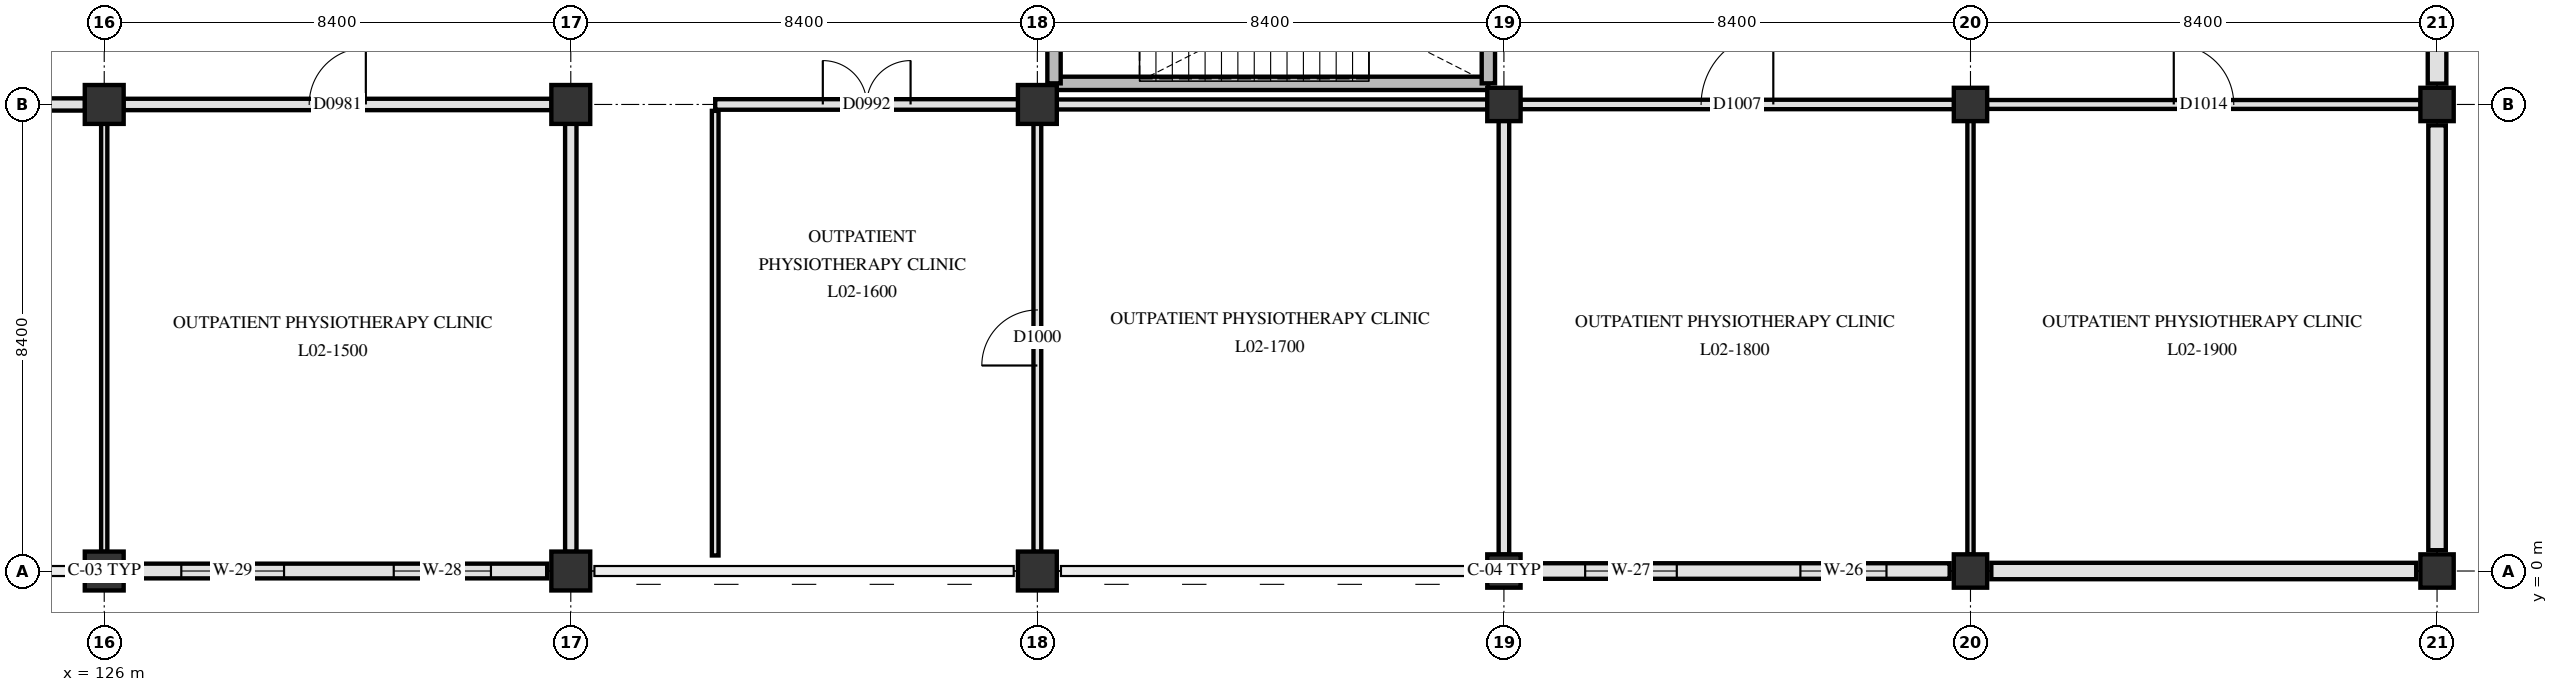
"""IFC4 building model, lengths in metres.
Left out: names, types, materials, properties, quantities, classifications, styles, units other than length and angle.
Written with IfcOpenShell. Run it as: python <this file> out.ifc"""

import sys

from ifc_helpers import new_model, si_unit, direction, frame, frame_2d, origin, origin_2d, place, context, subcontext, project, spatial, rectangle, extrude, element, fill, save


model = new_model("IFC4")
c1 = context("Model", 3, precision=1e-05, world=origin(), true_north=direction((0.0, 1.0)))
c2 = subcontext(c1, "Body", "Model", "MODEL_VIEW")
j1 = project(units=[si_unit("LENGTHUNIT", "METRE"), si_unit("PLANEANGLEUNIT", "RADIAN")], contexts=[c1])
p1 = place(None, origin())
s1 = spatial("IfcSite", under=j1, at=p1, CompositionType="ELEMENT")
p2 = place(p1, origin())
s2 = spatial("IfcBuilding", under=s1, at=p2, CompositionType="ELEMENT")
p3 = place(p2, frame((0.0, 0.0, 9.3)))
s3 = spatial("IfcBuildingStorey", under=s2, at=p3, CompositionType="ELEMENT", Elevation=9.3)
for number, where, z_axis, x_axis in (
    (1, (126.0, 0.0, 0.0), (0.0, 0.0, 1.0), (1.0, 0.0, 0.0)),
    (2, (126.0, 8.4, 0.0), (0.0, 0.0, 1.0), (1.0, 0.0, 0.0)),
    (3, (134.4, 0.0, 0.0), (0.0, 0.0, 1.0), (1.0, 0.0, 0.0)),
    (4, (134.4, 8.4, 0.0), (0.0, 0.0, 1.0), (1.0, 0.0, 0.0)),
    (5, (142.8, 0.0, 0.0), (0.0, 0.0, 1.0), (1.0, 0.0, 0.0)),
    (6, (142.8, 8.4, 0.0), (0.0, 0.0, 1.0), (1.0, 0.0, 0.0)),
):
    element("IfcColumn", number, at=place(p3, frame(where, z_axis=z_axis, x_axis=x_axis)), inside=s3, PredefinedType="COLUMN", context=c2, shape_type="SweptSolid", body=[
        extrude(rectangle(XDim=0.7, YDim=0.7, at=origin_2d()), origin(), (0.0, 0.0, 1.0), 5.1),
    ])
for number, where, z_axis, x_axis in (
    (7, (151.2, 0.0, 0.0), (0.0, 0.0, 1.0), (1.0, 0.0, 0.0)),
    (8, (151.2, 8.4, 0.0), (0.0, 0.0, 1.0), (1.0, 0.0, 0.0)),
    (9, (159.6, 0.0, 0.0), (0.0, 0.0, 1.0), (1.0, 0.0, 0.0)),
    (10, (159.6, 8.4, 0.0), (0.0, 0.0, 1.0), (1.0, 0.0, 0.0)),
    (11, (168.0, 0.0, 0.0), (0.0, 0.0, 1.0), (1.0, 0.0, 0.0)),
    (12, (168.0, 8.4, 0.0), (0.0, 0.0, 1.0), (1.0, 0.0, 0.0)),
):
    element("IfcColumn", number, at=place(p3, frame(where, z_axis=z_axis, x_axis=x_axis)), inside=s3, PredefinedType="COLUMN", context=c2, shape_type="SweptSolid", body=[
        extrude(rectangle(XDim=0.6, YDim=0.6, at=origin_2d()), origin(), (0.0, 0.0, 1.0), 5.1),
    ])
p4 = place(p3, frame((168.0, 16.425, 0.0), z_axis=(0.0, 0.0, 1.0), x_axis=(0.0, -1.0, 0.0)))
e13 = element("IfcWall", 13, at=p4, inside=s3, PredefinedType="SOLIDWALL", context=c2, shape_type="SweptSolid", body=[
    extrude(rectangle(XDim=7.65, YDim=0.335, at=frame_2d((3.825, 0.0))), origin(), (0.0, 0.0, 1.0), 4.07),
])
p5 = place(p4, frame((1.238, 0.0, 0.85)))
e14 = element("IfcOpeningElement", 14, at=p5, cuts=e13, PredefinedType="OPENING", context=c2, shape_type="SweptSolid", body=[
    extrude(rectangle(XDim=1.35, YDim=1.54, at=frame_2d((0.675, 0.77))), frame((0.0, 0.177, 0.0), z_axis=(0.0, -1.0, 0.0), x_axis=(1.0, 0.0, 0.0)), (0.0, 0.0, 1.0), 0.355),
])
p6 = place(p4, frame((5.012, 0.0, 0.85)))
e15 = element("IfcOpeningElement", 15, at=p6, cuts=e13, PredefinedType="OPENING", context=c2, shape_type="SweptSolid", body=[
    extrude(rectangle(XDim=1.45, YDim=1.54, at=frame_2d((0.725, 0.77))), frame((0.0, 0.177, 0.0), z_axis=(0.0, -1.0, 0.0), x_axis=(1.0, 0.0, 0.0)), (0.0, 0.0, 1.0), 0.355),
])
p7 = place(p3, frame((168.0, 8.025, 0.0), z_axis=(0.0, 0.0, 1.0), x_axis=(0.0, -1.0, 0.0)))
e16 = element("IfcWall", 16, at=p7, inside=s3, PredefinedType="SOLIDWALL", context=c2, shape_type="SweptSolid", body=[
    extrude(rectangle(XDim=7.65, YDim=0.315, at=frame_2d((3.825, 0.0))), origin(), (0.0, 0.0, 1.0), 4.07),
])
p8 = place(p3, frame((167.625, 0.0, 0.0), z_axis=(0.0, 0.0, 1.0), x_axis=(-1.0, 0.0, 0.0)))
e17 = element("IfcWall", 17, at=p8, inside=s3, PredefinedType="SOLIDWALL", context=c2, shape_type="SweptSolid", body=[
    extrude(rectangle(XDim=7.65, YDim=0.295, at=frame_2d((3.825, 0.0))), origin(), (0.0, 0.0, 1.0), 4.07),
])
p9 = place(p3, frame((159.225, 0.0, 0.0), z_axis=(0.0, 0.0, 1.0), x_axis=(-1.0, 0.0, 0.0)))
e18 = element("IfcWall", 18, at=p9, inside=s3, PredefinedType="SOLIDWALL", context=c2, shape_type="SweptSolid", body=[
    extrude(rectangle(XDim=7.65, YDim=0.28, at=frame_2d((3.825, 0.0))), origin(), (0.0, 0.0, 1.0), 4.07),
])
p10 = place(p9, frame((1.137, 0.0, 0.85)))
e19 = element("IfcOpeningElement", 19, at=p10, cuts=e18, PredefinedType="OPENING", context=c2, shape_type="SweptSolid", body=[
    extrude(rectangle(XDim=1.55, YDim=1.54, at=frame_2d((0.775, 0.77))), frame((0.0, 0.15, 0.0), z_axis=(0.0, -1.0, 0.0), x_axis=(1.0, 0.0, 0.0)), (0.0, 0.0, 1.0), 0.3),
])
p11 = place(p9, frame((4.913, 0.0, 0.85)))
e20 = element("IfcOpeningElement", 20, at=p11, cuts=e18, PredefinedType="OPENING", context=c2, shape_type="SweptSolid", body=[
    extrude(rectangle(XDim=1.65, YDim=1.54, at=frame_2d((0.825, 0.77))), frame((0.0, 0.15, 0.0), z_axis=(0.0, -1.0, 0.0), x_axis=(1.0, 0.0, 0.0)), (0.0, 0.0, 1.0), 0.3),
])
p12 = place(p3, frame((133.975, 0.0, 0.0), z_axis=(0.0, 0.0, 1.0), x_axis=(-1.0, 0.0, 0.0)))
e21 = element("IfcWall", 21, at=p12, inside=s3, PredefinedType="SOLIDWALL", context=c2, shape_type="SweptSolid", body=[
    extrude(rectangle(XDim=7.55, YDim=0.265, at=frame_2d((3.775, 0.0))), origin(), (0.0, 0.0, 1.0), 4.07),
])
p13 = place(p12, frame((1.012, 0.0, 0.85)))
e22 = element("IfcOpeningElement", 22, at=p13, cuts=e21, PredefinedType="OPENING", context=c2, shape_type="SweptSolid", body=[
    extrude(rectangle(XDim=1.75, YDim=1.54, at=frame_2d((0.875, 0.77))), frame((0.0, 0.142, 0.0), z_axis=(0.0, -1.0, 0.0), x_axis=(1.0, 0.0, 0.0)), (0.0, 0.0, 1.0), 0.285),
])
p14 = place(p12, frame((4.738, 0.0, 0.85)))
e23 = element("IfcOpeningElement", 23, at=p14, cuts=e21, PredefinedType="OPENING", context=c2, shape_type="SweptSolid", body=[
    extrude(rectangle(XDim=1.85, YDim=1.54, at=frame_2d((0.925, 0.77))), frame((0.0, 0.142, 0.0), z_axis=(0.0, -1.0, 0.0), x_axis=(1.0, 0.0, 0.0)), (0.0, 0.0, 1.0), 0.285),
])
p15 = place(p3, frame((143.1, 8.78, 0.0), z_axis=(0.0, 0.0, 1.0), x_axis=(1.0, 0.0, 0.0)))
e24 = element("IfcWall", 24, at=p15, inside=s3, PredefinedType="SHEAR", context=c2, shape_type="SweptSolid", body=[
    extrude(rectangle(XDim=7.82, YDim=0.24, at=frame_2d((3.91, 0.0))), origin(), (0.0, 0.0, 1.0), 4.78),
])
for number, where, z_axis, x_axis in (
    (25, (143.1, 8.78, 0.0), (0.0, 0.0, 1.0), (0.0, 1.0, 0.0)),
    (26, (150.92, 8.78, 0.0), (0.0, 0.0, 1.0), (0.0, 1.0, 0.0)),
):
    element("IfcWall", number, at=place(p3, frame(where, z_axis=z_axis, x_axis=x_axis)), inside=s3, PredefinedType="SHEAR", context=c2, shape_type="SweptSolid", body=[
        extrude(rectangle(XDim=3.32, YDim=0.24, at=frame_2d((1.66, 0.0))), origin(), (0.0, 0.0, 1.0), 4.78),
    ])
p16 = place(p3, frame((117.945, 8.4, 0.0), z_axis=(0.0, 0.0, 1.0), x_axis=(1.0, 0.0, 0.0)))
e27 = element("IfcWall", 27, at=p16, inside=s3, PredefinedType="PARTITIONING", context=c2, shape_type="SweptSolid", body=[
    extrude(rectangle(XDim=7.71, YDim=0.22, at=frame_2d((3.855, 0.0))), origin(), (0.0, 0.0, 1.0), 4.17),
])
p17 = place(p16, frame((3.355, 0.0, 0.0)))
e28 = element("IfcOpeningElement", 28, at=p17, cuts=e27, PredefinedType="OPENING", context=c2, shape_type="SweptSolid", body=[
    extrude(rectangle(XDim=1.0, YDim=2.15, at=frame_2d((0.5, 1.075))), frame((0.0, 0.12, 0.0), z_axis=(0.0, -1.0, 0.0), x_axis=(1.0, 0.0, 0.0)), (0.0, 0.0, 1.0), 0.24),
])
p18 = place(p3, frame((126.345, 8.4, 0.0), z_axis=(0.0, 0.0, 1.0), x_axis=(1.0, 0.0, 0.0)))
e29 = element("IfcWall", 29, at=p18, inside=s3, PredefinedType="PARTITIONING", context=c2, shape_type="SweptSolid", body=[
    extrude(rectangle(XDim=7.71, YDim=0.205, at=frame_2d((3.855, 0.0))), origin(), (0.0, 0.0, 1.0), 4.17),
])
p19 = place(p18, frame((3.345, 0.0, 0.0)))
e30 = element("IfcOpeningElement", 30, at=p19, cuts=e29, PredefinedType="OPENING", context=c2, shape_type="SweptSolid", body=[
    extrude(rectangle(XDim=1.02, YDim=2.12, at=frame_2d((0.51, 1.06))), frame((0.0, 0.113, 0.0), z_axis=(0.0, -1.0, 0.0), x_axis=(1.0, 0.0, 0.0)), (0.0, 0.0, 1.0), 0.225),
])
p20 = place(p3, frame((137.0, 8.4, 0.0), z_axis=(0.0, 0.0, 1.0), x_axis=(1.0, 0.0, 0.0)))
e31 = element("IfcWall", 31, at=p20, inside=s3, PredefinedType="PARTITIONING", context=c2, shape_type="SweptSolid", body=[
    extrude(rectangle(XDim=5.455, YDim=0.19, at=frame_2d((2.728, 0.0))), origin(), (0.0, 0.0, 1.0), 4.17),
])
p21 = place(p20, frame((1.938, 0.0, 0.0)))
e32 = element("IfcOpeningElement", 32, at=p21, cuts=e31, PredefinedType="OPENING", context=c2, shape_type="SweptSolid", body=[
    extrude(rectangle(XDim=1.58, YDim=2.22, at=frame_2d((0.79, 1.11))), frame((0.0, 0.105, 0.0), z_axis=(0.0, -1.0, 0.0), x_axis=(1.0, 0.0, 0.0)), (0.0, 0.0, 1.0), 0.21),
])
p22 = place(p3, frame((143.145, 8.4, 0.0), z_axis=(0.0, 0.0, 1.0), x_axis=(1.0, 0.0, 0.0)))
e33 = element("IfcWall", 33, at=p22, inside=s3, PredefinedType="PARTITIONING", context=c2, shape_type="SweptSolid", body=[
    extrude(rectangle(XDim=7.76, YDim=0.18, at=frame_2d((3.88, 0.0))), origin(), (0.0, 0.0, 1.0), 4.17),
])
p23 = place(p3, frame((151.495, 8.4, 0.0), z_axis=(0.0, 0.0, 1.0), x_axis=(1.0, 0.0, 0.0)))
e34 = element("IfcWall", 34, at=p23, inside=s3, PredefinedType="PARTITIONING", context=c2, shape_type="SweptSolid", body=[
    extrude(rectangle(XDim=7.81, YDim=0.17, at=frame_2d((3.905, 0.0))), origin(), (0.0, 0.0, 1.0), 4.17),
])
p24 = place(p23, frame((3.255, 0.0, 0.0)))
e35 = element("IfcOpeningElement", 35, at=p24, cuts=e34, PredefinedType="OPENING", context=c2, shape_type="SweptSolid", body=[
    extrude(rectangle(XDim=1.3, YDim=2.2, at=frame_2d((0.65, 1.1))), frame((0.0, 0.095, 0.0), z_axis=(0.0, -1.0, 0.0), x_axis=(1.0, 0.0, 0.0)), (0.0, 0.0, 1.0), 0.19),
])
p25 = place(p3, frame((159.895, 8.4, 0.0), z_axis=(0.0, 0.0, 1.0), x_axis=(1.0, 0.0, 0.0)))
e36 = element("IfcWall", 36, at=p25, inside=s3, PredefinedType="PARTITIONING", context=c2, shape_type="SweptSolid", body=[
    extrude(rectangle(XDim=7.81, YDim=0.16, at=frame_2d((3.905, 0.0))), origin(), (0.0, 0.0, 1.0), 4.17),
])
p26 = place(p25, frame((3.365, 0.0, 0.0)))
e37 = element("IfcOpeningElement", 37, at=p26, cuts=e36, PredefinedType="OPENING", context=c2, shape_type="SweptSolid", body=[
    extrude(rectangle(XDim=1.08, YDim=2.12, at=frame_2d((0.54, 1.06))), frame((0.0, 0.09, 0.0), z_axis=(0.0, -1.0, 0.0), x_axis=(1.0, 0.0, 0.0)), (0.0, 0.0, 1.0), 0.18),
])
p27 = place(p3, frame((126.0, 0.345, 0.0), z_axis=(0.0, 0.0, 1.0), x_axis=(0.0, 1.0, 0.0)))
e38 = element("IfcWall", 38, at=p27, inside=s3, PredefinedType="PARTITIONING", context=c2, shape_type="SweptSolid", body=[
    extrude(rectangle(XDim=7.71, YDim=0.112, at=frame_2d((3.855, 0.0))), origin(), (0.0, 0.0, 1.0), 4.17),
])
p28 = place(p3, frame((134.4, 0.345, 0.0), z_axis=(0.0, 0.0, 1.0), x_axis=(0.0, 1.0, 0.0)))
e39 = element("IfcWall", 39, at=p28, inside=s3, PredefinedType="PARTITIONING", context=c2, shape_type="SweptSolid", body=[
    extrude(rectangle(XDim=7.71, YDim=0.205, at=frame_2d((3.855, 0.0))), origin(), (0.0, 0.0, 1.0), 4.17),
])
p29 = place(p3, frame((137.0, 0.28, 0.0), z_axis=(0.0, 0.0, 1.0), x_axis=(0.0, 1.0, 0.0)))
e40 = element("IfcWall", 40, at=p29, inside=s3, PredefinedType="PARTITIONING", context=c2, shape_type="SweptSolid", body=[
    extrude(rectangle(XDim=8.005, YDim=0.12, at=frame_2d((4.002, 0.0))), origin(), (0.0, 0.0, 1.0), 4.17),
])
p30 = place(p3, frame((142.8, 0.345, 0.0), z_axis=(0.0, 0.0, 1.0), x_axis=(0.0, 1.0, 0.0)))
e41 = element("IfcWall", 41, at=p30, inside=s3, PredefinedType="PARTITIONING", context=c2, shape_type="SweptSolid", body=[
    extrude(rectangle(XDim=7.71, YDim=0.14, at=frame_2d((3.855, 0.0))), origin(), (0.0, 0.0, 1.0), 4.17),
])
p31 = place(p30, frame((3.355, 0.0, 0.0)))
e42 = element("IfcOpeningElement", 42, at=p31, cuts=e41, PredefinedType="OPENING", context=c2, shape_type="SweptSolid", body=[
    extrude(rectangle(XDim=1.0, YDim=2.15, at=frame_2d((0.5, 1.075))), frame((0.0, 0.08, 0.0), z_axis=(0.0, -1.0, 0.0), x_axis=(1.0, 0.0, 0.0)), (0.0, 0.0, 1.0), 0.16),
])
p32 = place(p3, frame((151.2, 0.295, 0.0), z_axis=(0.0, 0.0, 1.0), x_axis=(0.0, 1.0, 0.0)))
e43 = element("IfcWall", 43, at=p32, inside=s3, PredefinedType="PARTITIONING", context=c2, shape_type="SweptSolid", body=[
    extrude(rectangle(XDim=7.81, YDim=0.19, at=frame_2d((3.905, 0.0))), origin(), (0.0, 0.0, 1.0), 4.17),
])
p33 = place(p3, frame((159.6, 0.295, 0.0), z_axis=(0.0, 0.0, 1.0), x_axis=(0.0, 1.0, 0.0)))
e44 = element("IfcWall", 44, at=p33, inside=s3, PredefinedType="PARTITIONING", context=c2, shape_type="SweptSolid", body=[
    extrude(rectangle(XDim=7.81, YDim=0.112, at=frame_2d((3.905, 0.0))), origin(), (0.0, 0.0, 1.0), 4.17),
])
p34 = place(p10, origin())
e45 = element("IfcWindow", 45, at=p34, inside=s3, PartitioningType="SINGLE_PANEL", PredefinedType="WINDOW", context=c2, shape_type="SweptSolid", body=[
    extrude(rectangle(XDim=1.55, YDim=1.54, at=frame_2d((0.775, 0.77))), frame((0.0, 0.03, 0.0), z_axis=(0.0, -1.0, 0.0), x_axis=(1.0, 0.0, 0.0)), (0.0, 0.0, 1.0), 0.06),
])
fill(e19, e45)
p35 = place(p11, origin())
e46 = element("IfcWindow", 46, at=p35, inside=s3, PartitioningType="SINGLE_PANEL", PredefinedType="WINDOW", context=c2, shape_type="SweptSolid", body=[
    extrude(rectangle(XDim=1.65, YDim=1.54, at=frame_2d((0.825, 0.77))), frame((0.0, 0.03, 0.0), z_axis=(0.0, -1.0, 0.0), x_axis=(1.0, 0.0, 0.0)), (0.0, 0.0, 1.0), 0.06),
])
fill(e20, e46)
p36 = place(p13, origin())
e47 = element("IfcWindow", 47, at=p36, inside=s3, PartitioningType="SINGLE_PANEL", PredefinedType="WINDOW", context=c2, shape_type="SweptSolid", body=[
    extrude(rectangle(XDim=1.75, YDim=1.54, at=frame_2d((0.875, 0.77))), frame((0.0, 0.03, 0.0), z_axis=(0.0, -1.0, 0.0), x_axis=(1.0, 0.0, 0.0)), (0.0, 0.0, 1.0), 0.06),
])
fill(e22, e47)
p37 = place(p14, origin())
e48 = element("IfcWindow", 48, at=p37, inside=s3, PartitioningType="SINGLE_PANEL", PredefinedType="WINDOW", context=c2, shape_type="SweptSolid", body=[
    extrude(rectangle(XDim=1.85, YDim=1.54, at=frame_2d((0.925, 0.77))), frame((0.0, 0.03, 0.0), z_axis=(0.0, -1.0, 0.0), x_axis=(1.0, 0.0, 0.0)), (0.0, 0.0, 1.0), 0.06),
])
fill(e23, e48)
p38 = place(p19, origin())
e49 = element("IfcDoor", 49, at=p38, inside=s3, OperationType="SINGLE_SWING_RIGHT", PredefinedType="DOOR", context=c2, shape_type="SweptSolid", body=[
    extrude(rectangle(XDim=1.02, YDim=2.12, at=frame_2d((0.51, 1.06))), frame((0.0, 0.025, 0.0), z_axis=(0.0, -1.0, 0.0), x_axis=(1.0, 0.0, 0.0)), (0.0, 0.0, 1.0), 0.05),
])
fill(e30, e49)
p39 = place(p21, origin())
e50 = element("IfcDoor", 50, at=p39, inside=s3, OperationType="DOUBLE_SWING_LEFT", PredefinedType="DOOR", context=c2, shape_type="SweptSolid", body=[
    extrude(rectangle(XDim=1.58, YDim=2.22, at=frame_2d((0.79, 1.11))), frame((0.0, 0.025, 0.0), z_axis=(0.0, -1.0, 0.0), x_axis=(1.0, 0.0, 0.0)), (0.0, 0.0, 1.0), 0.05),
])
fill(e32, e50)
p40 = place(p31, origin())
e51 = element("IfcDoor", 51, at=p40, inside=s3, OperationType="SINGLE_SWING_LEFT", PredefinedType="DOOR", context=c2, shape_type="SweptSolid", body=[
    extrude(rectangle(XDim=1.0, YDim=2.15, at=frame_2d((0.5, 1.075))), frame((0.0, 0.025, 0.0), z_axis=(0.0, -1.0, 0.0), x_axis=(1.0, 0.0, 0.0)), (0.0, 0.0, 1.0), 0.05),
])
fill(e42, e51)
p41 = place(p24, origin())
e52 = element("IfcDoor", 52, at=p41, inside=s3, OperationType="SINGLE_SWING_RIGHT", PredefinedType="DOOR", context=c2, shape_type="SweptSolid", body=[
    extrude(rectangle(XDim=1.3, YDim=2.2, at=frame_2d((0.65, 1.1))), frame((0.0, 0.025, 0.0), z_axis=(0.0, -1.0, 0.0), x_axis=(1.0, 0.0, 0.0)), (0.0, 0.0, 1.0), 0.05),
])
fill(e35, e52)
p42 = place(p26, origin())
e53 = element("IfcDoor", 53, at=p42, inside=s3, OperationType="SINGLE_SWING_LEFT", PredefinedType="DOOR", context=c2, shape_type="SweptSolid", body=[
    extrude(rectangle(XDim=1.08, YDim=2.12, at=frame_2d((0.54, 1.06))), frame((0.0, 0.025, 0.0), z_axis=(0.0, -1.0, 0.0), x_axis=(1.0, 0.0, 0.0)), (0.0, 0.0, 1.0), 0.05),
])
fill(e37, e53)
save(model, sys.argv[1])
